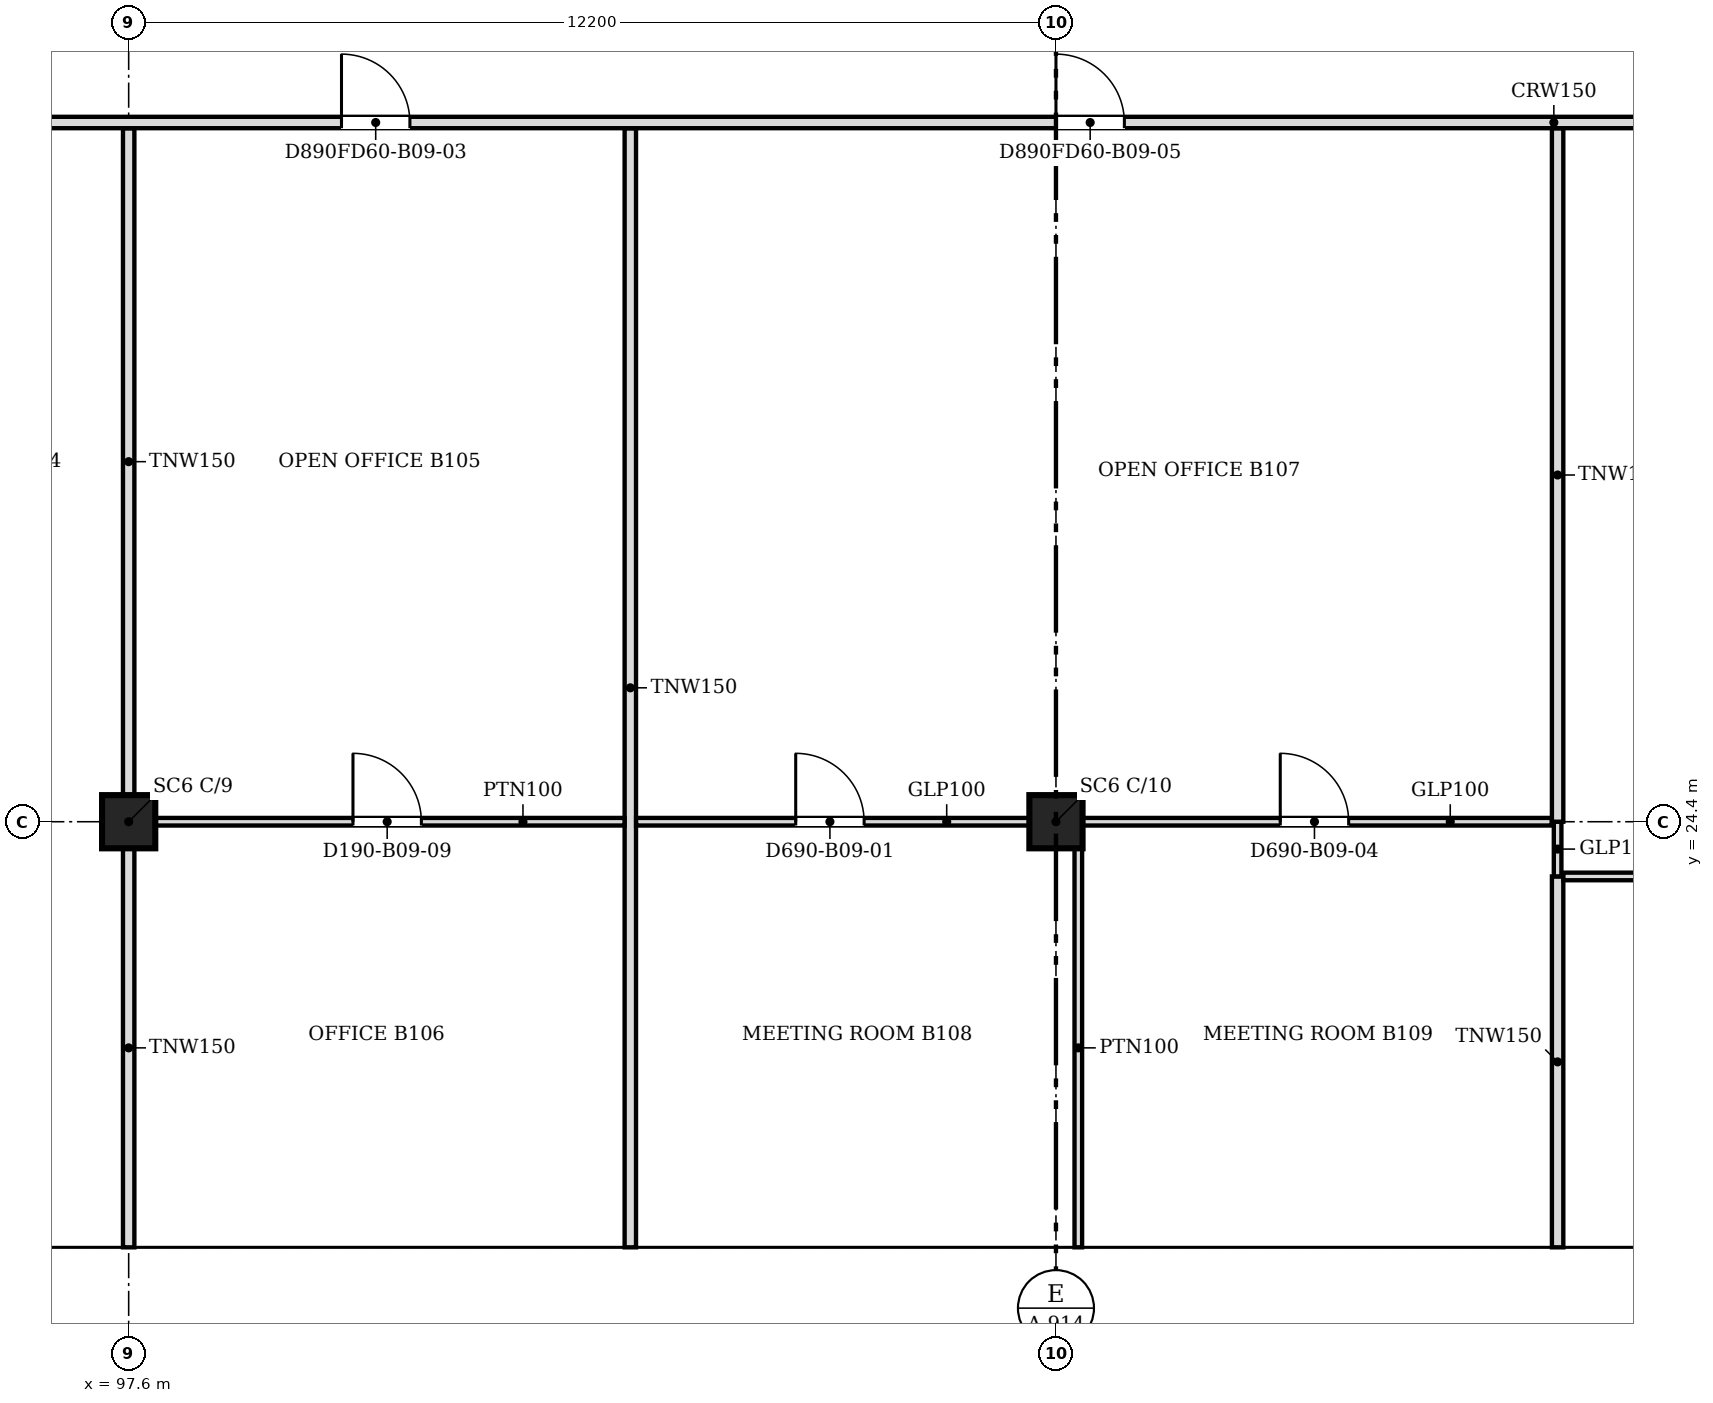
"""IFC4 building model, lengths in metres.
Left out: names, types, materials, properties, quantities, classifications, styles, units other than length and angle.
Written with IfcOpenShell. Run it as: python <this file> out.ifc"""

import sys

from ifc_helpers import new_model, si_unit, direction, frame, frame_2d, origin, origin_2d, place, context, subcontext, project, spatial, polyline, rectangle, outline, extrude, faceted_brep, source, transform, mapped, element, fill, save


model = new_model("IFC4")
c1 = context("Model", 3, precision=1e-05, world=origin(), true_north=direction((0.0, 1.0)))
c2 = subcontext(c1, "Body", "Model", "MODEL_VIEW")
j1 = project(units=[si_unit("LENGTHUNIT", "METRE"), si_unit("PLANEANGLEUNIT", "RADIAN")], contexts=[c1])
p1 = place(None, origin())
s1 = spatial("IfcSite", under=j1, at=p1, CompositionType="ELEMENT")
p2 = place(p1, origin())
s2 = spatial("IfcBuilding", under=s1, at=p2, CompositionType="ELEMENT")
p3 = place(p2, frame((0.0, 0.0, 91.4)))
s3 = spatial("IfcBuildingStorey", under=s2, at=p3, CompositionType="ELEMENT", Elevation=91.4)
for number, where, z_axis, x_axis in (
    (1, (97.6, 24.4, 0.0), (0.0, 0.0, 1.0), (1.0, 0.0, 0.0)),
    (2, (109.8, 24.4, 0.0), (0.0, 0.0, 1.0), (1.0, 0.0, 0.0)),
):
    element("IfcColumn", number, at=place(p3, frame(where, z_axis=z_axis, x_axis=x_axis)), inside=s3, PredefinedType="COLUMN", context=c2, shape_type="SweptSolid", body=[
        extrude(rectangle(XDim=0.7, YDim=0.7, at=origin_2d()), origin(), (0.0, 0.0, 1.0), 3.6),
    ])
m1 = source(origin(), c2, "Body", "Brep", [
    faceted_brep([(3.05, -0.25, 0.0), (6.1, -0.25, 3.8), (6.1, -0.25, 3.8), (3.05, -0.25, 7.6), (0.0, -0.25, 3.8), (0.0, 0.25, 3.8), (3.05, 0.25, 7.6), (6.1, 0.25, 3.8), (6.1, 0.25, 3.8), (3.05, 0.25, 0.0)], [[[0, 1, 2, 3, 4]], [[5, 6, 7, 8, 9]], [[9, 8, 1, 0]], [[7, 6, 3, 2]], [[6, 5, 4, 3]], [[5, 9, 0, 4]], [[1, 8, 7, 2]]]),
])
p4 = place(p3, frame((94.55, 18.55, -3.8), z_axis=(0.0, 0.0, 1.0), x_axis=(1.0, 0.0, 0.0)))
e3 = element("IfcWall", 3, at=p4, inside=s3, PredefinedType="SOLIDWALL", context=c2, shape_type="MappedRepresentation", body=[
    mapped(m1, transform((0.0, 0.0, 0.0), scale=1.0)),
])
m2 = source(origin(), c2, "Body", "SweptSolid", [
    extrude(outline(polyline([(3.05, 0.399), (5.78, 3.8), (3.05, 7.2), (0.321, 3.8), (3.05, 0.399)])), frame((0.0, 0.26, 0.0), z_axis=(0.0, -1.0, 0.0), x_axis=(1.0, 0.0, 0.0)), (0.0, 0.0, 1.0), 0.52),
])
p5 = place(p4, origin())
e4 = element("IfcOpeningElement", 4, at=p5, cuts=e3, PredefinedType="OPENING", context=c2, shape_type="MappedRepresentation", body=[
    mapped(m2, transform((0.0, 0.0, 0.0), scale=1.0)),
])
m3 = source(origin(), c2, "Body", "SweptSolid", [
    extrude(outline(polyline([(3.05, 0.0), (6.1, 3.8), (3.05, 7.6), (0.0, 3.8), (3.05, 0.0)])), frame((0.0, 0.25, 0.0), z_axis=(0.0, -1.0, 0.0), x_axis=(1.0, 0.0, 0.0)), (0.0, 0.0, 1.0), 0.5),
])
p6 = place(p3, frame((100.65, 18.55, -3.8), z_axis=(0.0, 0.0, 1.0), x_axis=(1.0, 0.0, 0.0)))
e5 = element("IfcWall", 5, at=p6, inside=s3, PredefinedType="SOLIDWALL", context=c2, shape_type="MappedRepresentation", body=[
    mapped(m3, transform((0.0, 0.0, 0.0), scale=1.0)),
])
p7 = place(p6, origin())
e6 = element("IfcOpeningElement", 6, at=p7, cuts=e5, PredefinedType="OPENING", context=c2, shape_type="MappedRepresentation", body=[
    mapped(m2, transform((0.0, 0.0, 0.0), scale=1.0)),
])
p8 = place(p3, frame((106.75, 18.55, -3.8), z_axis=(0.0, 0.0, 1.0), x_axis=(1.0, 0.0, 0.0)))
e7 = element("IfcWall", 7, at=p8, inside=s3, PredefinedType="SOLIDWALL", context=c2, shape_type="MappedRepresentation", body=[
    mapped(m3, transform((0.0, 0.0, 0.0), scale=1.0)),
])
p9 = place(p8, origin())
e8 = element("IfcOpeningElement", 8, at=p9, cuts=e7, PredefinedType="OPENING", context=c2, shape_type="MappedRepresentation", body=[
    mapped(m2, transform((0.0, 0.0, 0.0), scale=1.0)),
])
p10 = place(p3, frame((112.85, 18.55, -3.8), z_axis=(0.0, 0.0, 1.0), x_axis=(1.0, 0.0, 0.0)))
e9 = element("IfcWall", 9, at=p10, inside=s3, PredefinedType="SOLIDWALL", context=c2, shape_type="MappedRepresentation", body=[
    mapped(m1, transform((0.0, 0.0, 0.0), scale=1.0)),
])
p11 = place(p10, origin())
e10 = element("IfcOpeningElement", 10, at=p11, cuts=e9, PredefinedType="OPENING", context=c2, shape_type="MappedRepresentation", body=[
    mapped(m2, transform((0.0, 0.0, 0.0), scale=1.0)),
])
m4 = source(origin(), c2, "Body", "Brep", [
    faceted_brep([(3.003, -0.25, 0.0), (6.053, -0.25, 3.8), (0.0, -0.25, 3.8), (0.047, 0.25, 3.8), (6.053, 0.25, 3.8), (3.003, 0.25, 0.0), (0.047, 0.25, 3.741), (0.0, 0.0, 3.8)], [[[0, 1, 2]], [[3, 4, 5, 6]], [[5, 4, 1, 0]], [[4, 3, 7, 2, 1]], [[6, 5, 0, 2, 7]], [[6, 7, 3]]]),
])
p12 = place(p3, frame((91.547, 18.55, 0.0), z_axis=(0.0, 0.0, 1.0), x_axis=(1.0, 0.0, 0.0)))
e11 = element("IfcWall", 11, at=p12, inside=s3, PredefinedType="SOLIDWALL", context=c2, shape_type="MappedRepresentation", body=[
    mapped(m4, transform((0.0, 0.0, 0.0), scale=1.0)),
])
m5 = source(origin(), c2, "Body", "SweptSolid", [
    extrude(outline(polyline([(3.005, 0.401), (5.532, 3.55), (0.516, 3.55), (3.005, 0.401)])), frame((0.0, 0.26, 0.0), z_axis=(0.0, -1.0, 0.0), x_axis=(1.0, 0.0, 0.0)), (0.0, 0.0, 1.0), 0.52),
])
p13 = place(p12, origin())
e12 = element("IfcOpeningElement", 12, at=p13, cuts=e11, PredefinedType="OPENING", context=c2, shape_type="MappedRepresentation", body=[
    mapped(m5, transform((0.0, 0.0, 0.0), scale=1.0)),
])
m6 = source(origin(), c2, "Body", "Brep", [
    faceted_brep([(3.05, -0.25, 0.0), (6.1, -0.25, 3.8), (6.1, -0.25, 3.8), (0.0, -0.25, 3.8), (0.0, 0.25, 3.8), (6.1, 0.25, 3.8), (6.1, 0.25, 3.8), (3.05, 0.25, 0.0)], [[[0, 1, 2, 3]], [[4, 5, 6, 7]], [[7, 6, 1, 0]], [[5, 4, 3, 2]], [[4, 7, 0, 3]], [[1, 6, 5, 2]]]),
])
p14 = place(p3, frame((97.6, 18.55, 0.0), z_axis=(0.0, 0.0, 1.0), x_axis=(1.0, 0.0, 0.0)))
e13 = element("IfcWall", 13, at=p14, inside=s3, PredefinedType="SOLIDWALL", context=c2, shape_type="MappedRepresentation", body=[
    mapped(m6, transform((0.0, 0.0, 0.0), scale=1.0)),
])
m7 = source(origin(), c2, "Body", "SweptSolid", [
    extrude(outline(polyline([(3.05, 0.399), (5.579, 3.55), (0.521, 3.55), (3.05, 0.399)])), frame((0.0, 0.26, 0.0), z_axis=(0.0, -1.0, 0.0), x_axis=(1.0, 0.0, 0.0)), (0.0, 0.0, 1.0), 0.52),
])
p15 = place(p14, origin())
e14 = element("IfcOpeningElement", 14, at=p15, cuts=e13, PredefinedType="OPENING", context=c2, shape_type="MappedRepresentation", body=[
    mapped(m7, transform((0.0, 0.0, 0.0), scale=1.0)),
])
m8 = source(origin(), c2, "Body", "SweptSolid", [
    extrude(outline(polyline([(3.05, 0.0), (6.1, 3.8), (0.0, 3.8), (3.05, 0.0)])), frame((0.0, 0.25, 0.0), z_axis=(0.0, -1.0, 0.0), x_axis=(1.0, 0.0, 0.0)), (0.0, 0.0, 1.0), 0.5),
])
p16 = place(p3, frame((103.7, 18.55, 0.0), z_axis=(0.0, 0.0, 1.0), x_axis=(1.0, 0.0, 0.0)))
e15 = element("IfcWall", 15, at=p16, inside=s3, PredefinedType="SOLIDWALL", context=c2, shape_type="MappedRepresentation", body=[
    mapped(m8, transform((0.0, 0.0, 0.0), scale=1.0)),
])
p17 = place(p16, origin())
e16 = element("IfcOpeningElement", 16, at=p17, cuts=e15, PredefinedType="OPENING", context=c2, shape_type="MappedRepresentation", body=[
    mapped(m7, transform((0.0, 0.0, 0.0), scale=1.0)),
])
p18 = place(p3, frame((109.8, 18.55, 0.0), z_axis=(0.0, 0.0, 1.0), x_axis=(1.0, 0.0, 0.0)))
e17 = element("IfcWall", 17, at=p18, inside=s3, PredefinedType="SOLIDWALL", context=c2, shape_type="MappedRepresentation", body=[
    mapped(m6, transform((0.0, 0.0, 0.0), scale=1.0)),
])
p19 = place(p18, origin())
e18 = element("IfcOpeningElement", 18, at=p19, cuts=e17, PredefinedType="OPENING", context=c2, shape_type="MappedRepresentation", body=[
    mapped(m7, transform((0.0, 0.0, 0.0), scale=1.0)),
])
p20 = place(p3, frame((115.9, 18.55, 0.0), z_axis=(0.0, 0.0, 1.0), x_axis=(1.0, 0.0, 0.0)))
e19 = element("IfcWall", 19, at=p20, inside=s3, PredefinedType="SOLIDWALL", context=c2, shape_type="MappedRepresentation", body=[
    mapped(m8, transform((0.0, 0.0, 0.0), scale=1.0)),
])
p21 = place(p20, origin())
e20 = element("IfcOpeningElement", 20, at=p21, cuts=e19, PredefinedType="OPENING", context=c2, shape_type="MappedRepresentation", body=[
    mapped(m7, transform((0.0, 0.0, 0.0), scale=1.0)),
])
p22 = place(p3, frame((97.6, 18.8, 0.0), z_axis=(0.0, 0.0, 1.0), x_axis=(0.0, 1.0, 0.0)))
e21 = element("IfcWall", 21, at=p22, inside=s3, PredefinedType="PARTITIONING", context=c2, shape_type="SweptSolid", body=[
    extrude(rectangle(XDim=5.249, YDim=0.15, at=frame_2d((2.625, 0.0))), origin(), (0.0, 0.0, 1.0), 2.895),
])
p23 = place(p3, frame((104.2, 18.8, 0.0), z_axis=(0.0, 0.0, 1.0), x_axis=(0.0, 1.0, 0.0)))
e22 = element("IfcWall", 22, at=p23, inside=s3, PredefinedType="PARTITIONING", context=c2, shape_type="SweptSolid", body=[
    extrude(rectangle(XDim=14.724, YDim=0.15, at=frame_2d((7.362, 0.0))), origin(), (0.0, 0.0, 1.0), 2.895),
])
p24 = place(p3, frame((110.094, 18.8, 0.0), z_axis=(0.0, 0.0, 1.0), x_axis=(0.0, 1.0, 0.0)))
e23 = element("IfcWall", 23, at=p24, inside=s3, PredefinedType="PARTITIONING", context=c2, shape_type="SweptSolid", body=[
    extrude(rectangle(XDim=5.249, YDim=0.1, at=frame_2d((2.625, 0.0))), origin(), (0.0, 0.0, 1.0), 2.895),
])
p25 = place(p3, frame((116.4, 18.8, 0.0), z_axis=(0.0, 0.0, 1.0), x_axis=(0.0, 1.0, 0.0)))
e24 = element("IfcWall", 24, at=p25, inside=s3, PredefinedType="PARTITIONING", context=c2, shape_type="SweptSolid", body=[
    extrude(rectangle(XDim=4.88, YDim=0.15, at=frame_2d((2.44, 0.0))), origin(), (0.0, 0.0, 1.0), 2.895),
])
p26 = place(p3, frame((116.4, 23.681, 0.0), z_axis=(0.0, 0.0, 1.0), x_axis=(0.0, 1.0, 0.0)))
e25 = element("IfcWall", 25, at=p26, inside=s3, PredefinedType="PARTITIONING", context=c2, shape_type="SweptSolid", body=[
    extrude(rectangle(XDim=0.718, YDim=0.1, at=frame_2d((0.359, 0.0))), origin(), (0.0, 0.0, 1.0), 2.895),
])
p27 = place(p3, frame((122.243, 23.68, 0.0), z_axis=(0.0, 0.0, 1.0), x_axis=(-1.0, 0.0, 0.0)))
e26 = element("IfcWall", 26, at=p27, inside=s3, PredefinedType="PARTITIONING", context=c2, shape_type="SweptSolid", body=[
    extrude(rectangle(XDim=5.767, YDim=0.1, at=frame_2d((2.883, 0.0))), origin(), (0.0, 0.0, 1.0), 2.895),
])
m9 = source(origin(), c2, "Body", "SweptSolid", [
    extrude(rectangle(XDim=0.9, YDim=2.1, at=frame_2d((0.45, 1.05))), frame((0.0, 0.06, 0.0), z_axis=(0.0, -1.0, 0.0), x_axis=(1.0, 0.0, 0.0)), (0.0, 0.0, 1.0), 0.12),
])
p28 = place(p27, frame((2.467, 0.0, 0.0)))
e27 = element("IfcOpeningElement", 27, at=p28, cuts=e26, PredefinedType="OPENING", context=c2, shape_type="MappedRepresentation", body=[
    mapped(m9, transform((0.0, 0.0, 0.0), scale=1.0)),
])
p29 = place(p3, frame((104.124, 24.4, 0.0), z_axis=(0.0, 0.0, 1.0), x_axis=(-1.0, 0.0, 0.0)))
e28 = element("IfcWall", 28, at=p29, inside=s3, PredefinedType="PARTITIONING", context=c2, shape_type="SweptSolid", body=[
    extrude(rectangle(XDim=6.173, YDim=0.1, at=frame_2d((3.086, 0.0))), origin(), (0.0, 0.0, 1.0), 2.895),
])
p30 = place(p29, frame((2.673, 0.0, 0.0)))
e29 = element("IfcOpeningElement", 29, at=p30, cuts=e28, PredefinedType="OPENING", context=c2, shape_type="MappedRepresentation", body=[
    mapped(m9, transform((0.0, 0.0, 0.0), scale=1.0)),
])
p31 = place(p3, frame((109.449, 24.4, 0.0), z_axis=(0.0, 0.0, 1.0), x_axis=(-1.0, 0.0, 0.0)))
e30 = element("IfcWall", 30, at=p31, inside=s3, PredefinedType="PARTITIONING", context=c2, shape_type="SweptSolid", body=[
    extrude(rectangle(XDim=5.173, YDim=0.1, at=frame_2d((2.586, 0.0))), origin(), (0.0, 0.0, 1.0), 2.895),
])
p32 = place(p31, frame((2.173, 0.0, 0.0)))
e31 = element("IfcOpeningElement", 31, at=p32, cuts=e30, PredefinedType="OPENING", context=c2, shape_type="MappedRepresentation", body=[
    mapped(m9, transform((0.0, 0.0, 0.0), scale=1.0)),
])
p33 = place(p3, frame((116.324, 24.4, 0.0), z_axis=(0.0, 0.0, 1.0), x_axis=(-1.0, 0.0, 0.0)))
e32 = element("IfcWall", 32, at=p33, inside=s3, PredefinedType="PARTITIONING", context=c2, shape_type="SweptSolid", body=[
    extrude(rectangle(XDim=6.173, YDim=0.1, at=frame_2d((3.086, 0.0))), origin(), (0.0, 0.0, 1.0), 2.895),
])
p34 = place(p33, frame((2.673, 0.0, 0.0)))
e33 = element("IfcOpeningElement", 33, at=p34, cuts=e32, PredefinedType="OPENING", context=c2, shape_type="MappedRepresentation", body=[
    mapped(m9, transform((0.0, 0.0, 0.0), scale=1.0)),
])
p35 = place(p3, frame((116.4, 24.4, 0.0), z_axis=(0.0, 0.0, 1.0), x_axis=(0.0, 1.0, 0.0)))
e34 = element("IfcWall", 34, at=p35, inside=s3, PredefinedType="PARTITIONING", context=c2, shape_type="SweptSolid", body=[
    extrude(rectangle(XDim=9.124, YDim=0.15, at=frame_2d((4.562, 0.0))), origin(), (0.0, 0.0, 1.0), 2.895),
])
p36 = place(p3, frame((97.6, 24.751, 0.0), z_axis=(0.0, 0.0, 1.0), x_axis=(0.0, 1.0, 0.0)))
e35 = element("IfcWall", 35, at=p36, inside=s3, PredefinedType="PARTITIONING", context=c2, shape_type="SweptSolid", body=[
    extrude(rectangle(XDim=8.773, YDim=0.15, at=frame_2d((4.386, 0.0))), origin(), (0.0, 0.0, 1.0), 2.895),
])
p37 = place(p3, frame((133.7, 33.6, 0.0), z_axis=(0.0, 0.0, 1.0), x_axis=(-1.0, 0.0, 0.0)))
e36 = element("IfcWall", 36, at=p37, inside=s3, PredefinedType="PARTITIONING", context=c2, shape_type="SweptSolid", body=[
    extrude(rectangle(XDim=47.8, YDim=0.15, at=frame_2d((23.9, 0.0))), origin(), (0.0, 0.0, 1.0), 2.895),
])
m10 = source(origin(), c2, "Body", "SweptSolid", [
    extrude(rectangle(XDim=0.9, YDim=2.1, at=frame_2d((0.45, 1.05))), frame((0.0, 0.085, 0.0), z_axis=(0.0, -1.0, 0.0), x_axis=(1.0, 0.0, 0.0)), (0.0, 0.0, 1.0), 0.17),
])
p38 = place(p37, frame((2.099, 0.0, 0.0)))
e37 = element("IfcOpeningElement", 37, at=p38, cuts=e36, PredefinedType="OPENING", context=c2, shape_type="MappedRepresentation", body=[
    mapped(m10, transform((0.0, 0.0, 0.0), scale=1.0)),
])
m11 = source(origin(), c2, "Body", "SweptSolid", [
    extrude(rectangle(XDim=1.0, YDim=2.1, at=frame_2d((0.5, 1.05))), frame((0.0, 0.085, 0.0), z_axis=(0.0, -1.0, 0.0), x_axis=(1.0, 0.0, 0.0)), (0.0, 0.0, 1.0), 0.17),
])
p39 = place(p37, frame((38.399, 0.0, 0.0)))
e38 = element("IfcOpeningElement", 38, at=p39, cuts=e36, PredefinedType="OPENING", context=c2, shape_type="MappedRepresentation", body=[
    mapped(m11, transform((0.0, 0.0, 0.0), scale=1.0)),
])
p40 = place(p37, frame((44.3, 0.0, 0.0)))
e39 = element("IfcOpeningElement", 39, at=p40, cuts=e36, PredefinedType="OPENING", context=c2, shape_type="MappedRepresentation", body=[
    mapped(m10, transform((0.0, 0.0, 0.0), scale=1.0)),
])
p41 = place(p37, frame((32.4, 0.0, 0.0)))
e40 = element("IfcOpeningElement", 40, at=p41, cuts=e36, PredefinedType="OPENING", context=c2, shape_type="MappedRepresentation", body=[
    mapped(m10, transform((0.0, 0.0, 0.0), scale=1.0)),
])
p42 = place(p37, frame((10.799, 0.0, 0.0)))
e41 = element("IfcOpeningElement", 41, at=p42, cuts=e36, PredefinedType="OPENING", context=c2, shape_type="MappedRepresentation", body=[
    mapped(m10, transform((0.0, 0.0, 0.0), scale=1.0)),
])
p43 = place(p37, frame((23.0, 0.0, 0.0)))
e42 = element("IfcOpeningElement", 42, at=p43, cuts=e36, PredefinedType="OPENING", context=c2, shape_type="MappedRepresentation", body=[
    mapped(m10, transform((0.0, 0.0, 0.0), scale=1.0)),
])
m12 = source(origin(), c2, "Body", "SweptSolid", [
    extrude(rectangle(XDim=0.9, YDim=2.1, at=frame_2d((0.45, 1.05))), frame((0.0, 0.025, 0.0), z_axis=(0.0, -1.0, 0.0), x_axis=(1.0, 0.0, 0.0)), (0.0, 0.0, 1.0), 0.05),
])
p44 = place(p32, origin())
e43 = element("IfcDoor", 43, at=p44, inside=s3, OperationType="SINGLE_SWING_RIGHT", PredefinedType="DOOR", context=c2, shape_type="MappedRepresentation", body=[
    mapped(m12, transform((0.0, 0.0, 0.0), scale=1.0)),
])
fill(e31, e43)
p45 = place(p30, origin())
e44 = element("IfcDoor", 44, at=p45, inside=s3, OperationType="SINGLE_SWING_RIGHT", PredefinedType="DOOR", context=c2, shape_type="MappedRepresentation", body=[
    mapped(m12, transform((0.0, 0.0, 0.0), scale=1.0)),
])
fill(e29, e44)
p46 = place(p34, origin())
e45 = element("IfcDoor", 45, at=p46, inside=s3, OperationType="SINGLE_SWING_RIGHT", PredefinedType="DOOR", context=c2, shape_type="MappedRepresentation", body=[
    mapped(m12, transform((0.0, 0.0, 0.0), scale=1.0)),
])
fill(e33, e45)
p47 = place(p41, origin())
e46 = element("IfcDoor", 46, at=p47, inside=s3, OperationType="SINGLE_SWING_RIGHT", PredefinedType="DOOR", context=c2, shape_type="MappedRepresentation", body=[
    mapped(m12, transform((0.0, 0.0, 0.0), scale=1.0)),
])
fill(e40, e46)
p48 = place(p43, origin())
e47 = element("IfcDoor", 47, at=p48, inside=s3, OperationType="SINGLE_SWING_RIGHT", PredefinedType="DOOR", context=c2, shape_type="MappedRepresentation", body=[
    mapped(m12, transform((0.0, 0.0, 0.0), scale=1.0)),
])
fill(e42, e47)
save(model, sys.argv[1])
